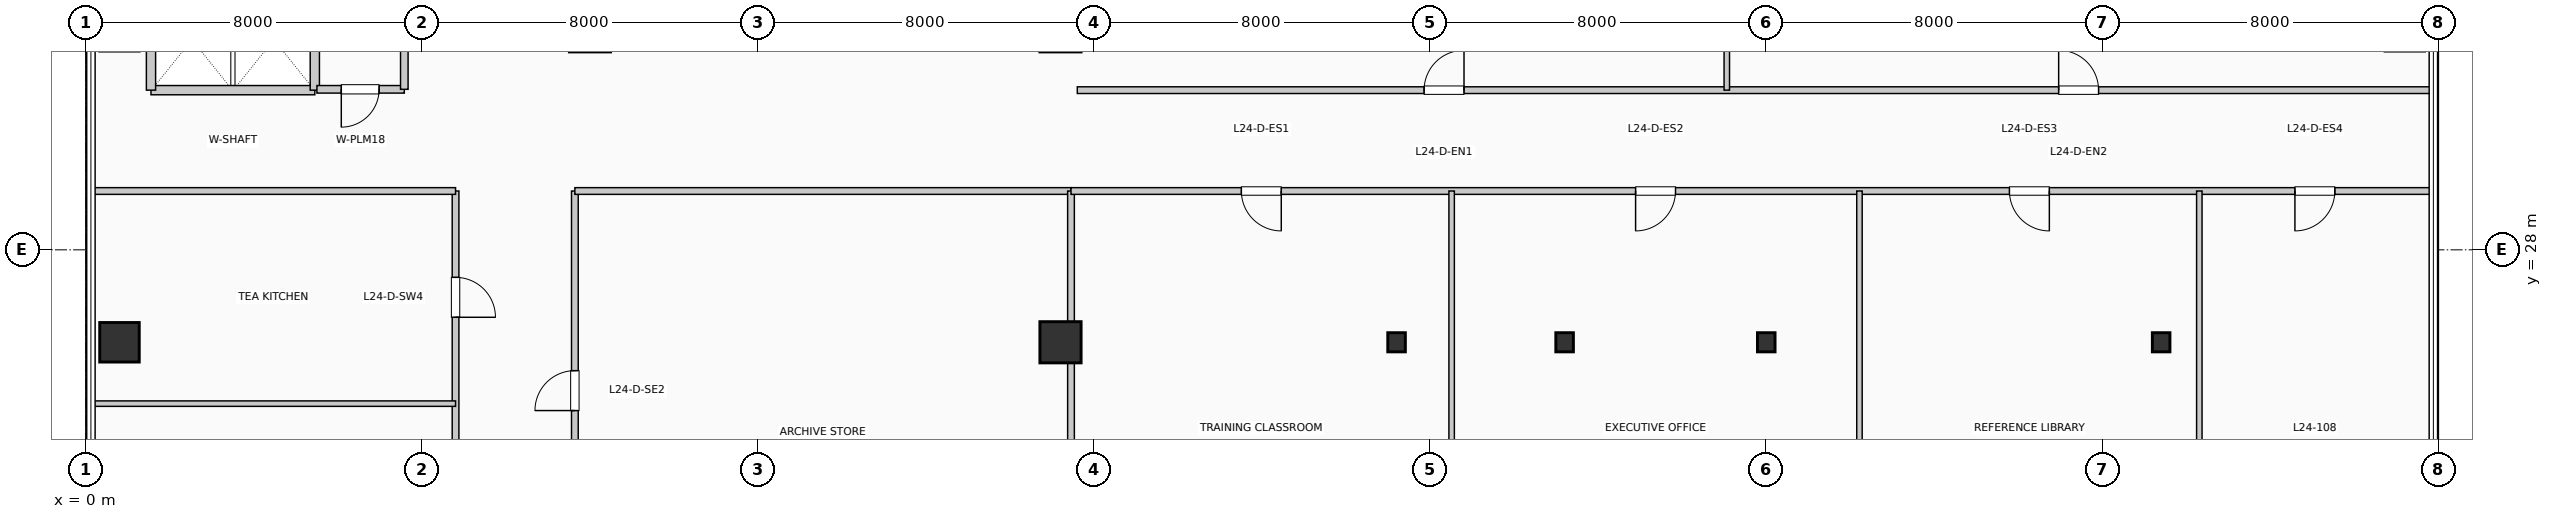
"""IFC4 building model, lengths in metres.
Left out: names, types, materials, properties, quantities, classifications, styles, units other than length and angle.
Written with IfcOpenShell. Run it as: python <this file> out.ifc"""

import sys

from ifc_helpers import new_model, si_unit, direction, frame, frame_2d, origin, origin_2d, place, context, subcontext, project, spatial, rectangle, i_section, extrude, element, fill, save


model = new_model("IFC4")
c1 = context("Model", 3, precision=1e-05, world=origin(), true_north=direction((0.0, 1.0)))
c2 = subcontext(c1, "Body", "Model", "MODEL_VIEW")
j1 = project(units=[si_unit("LENGTHUNIT", "METRE"), si_unit("PLANEANGLEUNIT", "RADIAN")], contexts=[c1])
p1 = place(None, origin())
s1 = spatial("IfcSite", under=j1, at=p1, CompositionType="ELEMENT")
p2 = place(p1, origin())
s2 = spatial("IfcBuilding", under=s1, at=p2, CompositionType="ELEMENT")
p3 = place(p2, frame((0.0, 0.0, 102.63)))
s3 = spatial("IfcBuildingStorey", under=s2, at=p3, CompositionType="ELEMENT", Elevation=102.63)
p4 = place(p3, frame((0.8, 25.8, 0.0), z_axis=(0.0, 0.0, 1.0), x_axis=(1.0, 0.0, 0.0)))
e1 = element("IfcColumn", 1, at=p4, inside=s3, PredefinedType="COLUMN", context=c2, shape_type="SweptSolid", body=[
    extrude(rectangle(XDim=0.94, YDim=0.94, at=origin_2d()), origin(), (0.0, 0.0, 1.0), 3.96),
])
p5 = place(p3, frame((23.2, 25.8, 0.0), z_axis=(0.0, 0.0, 1.0), x_axis=(1.0, 0.0, 0.0)))
e2 = element("IfcColumn", 2, at=p5, inside=s3, PredefinedType="COLUMN", context=c2, shape_type="SweptSolid", body=[
    extrude(rectangle(XDim=0.98, YDim=0.98, at=origin_2d()), origin(), (0.0, 0.0, 1.0), 3.96),
])
for number, where, z_axis, x_axis in (
    (3, (31.2, 25.8, 0.0), (0.0, 0.0, 1.0), (1.0, 0.0, 0.0)),
    (4, (35.2, 25.8, 0.0), (0.0, 0.0, 1.0), (1.0, 0.0, 0.0)),
    (5, (40.0, 25.8, 0.0), (0.0, 0.0, 1.0), (1.0, 0.0, 0.0)),
    (6, (49.4, 25.8, 0.0), (0.0, 0.0, 1.0), (1.0, 0.0, 0.0)),
):
    element("IfcColumn", number, at=place(p3, frame(where, z_axis=z_axis, x_axis=x_axis)), inside=s3, PredefinedType="COLUMN", context=c2, shape_type="SweptSolid", body=[
        extrude(i_section(OverallWidth=0.418, OverallDepth=0.455, WebThickness=0.032, FlangeThickness=0.051, at=origin_2d()), origin(), (0.0, 0.0, 1.0), 3.96),
    ])
p6 = place(p3, frame((1.55, 31.8, 0.0), z_axis=(0.0, 0.0, 1.0), x_axis=(1.0, 0.0, 0.0)))
e7 = element("IfcWall", 7, at=p6, inside=s3, PredefinedType="PARTITIONING", context=c2, shape_type="SweptSolid", body=[
    extrude(rectangle(XDim=3.9, YDim=0.22, at=frame_2d((1.95, 0.0))), origin(), (0.0, 0.0, 1.0), 3.71),
])
for number, where, z_axis, x_axis in (
    (8, (1.55, 31.8, 0.0), (0.0, 0.0, 1.0), (0.0, 1.0, 0.0)),
    (9, (5.45, 31.8, 0.0), (0.0, 0.0, 1.0), (0.0, 1.0, 0.0)),
):
    element("IfcWall", number, at=place(p3, frame(where, z_axis=z_axis, x_axis=x_axis)), inside=s3, PredefinedType="PARTITIONING", context=c2, shape_type="SweptSolid", body=[
        extrude(rectangle(XDim=2.38, YDim=0.22, at=frame_2d((1.19, 0.0))), origin(), (0.0, 0.0, 1.0), 3.71),
    ])
p7 = place(p3, frame((5.5, 31.82, 0.0), z_axis=(0.0, 0.0, 1.0), x_axis=(1.0, 0.0, 0.0)))
e10 = element("IfcWall", 10, at=p7, inside=s3, PredefinedType="PLUMBINGWALL", context=c2, shape_type="SweptSolid", body=[
    extrude(rectangle(XDim=2.08, YDim=0.18, at=frame_2d((1.04, 0.0))), origin(), (0.0, 0.0, 1.0), 3.71),
])
p8 = place(p7, frame((1.48, 0.0, 0.0), z_axis=(0.0, 0.0, 1.0), x_axis=(-1.0, 0.0, 0.0)))
e11 = element("IfcOpeningElement", 11, at=p8, cuts=e10, PredefinedType="OPENING", context=c2, shape_type="SweptSolid", body=[
    extrude(rectangle(XDim=0.9, YDim=2.1, at=frame_2d((0.45, 1.05))), frame((0.0, 0.1, 0.0), z_axis=(0.0, -1.0, 0.0), x_axis=(1.0, 0.0, 0.0)), (0.0, 0.0, 1.0), 0.2),
])
p9 = place(p3, frame((7.58, 31.82, 0.0), z_axis=(0.0, 0.0, 1.0), x_axis=(0.0, 1.0, 0.0)))
e12 = element("IfcWall", 12, at=p9, inside=s3, PredefinedType="PLUMBINGWALL", context=c2, shape_type="SweptSolid", body=[
    extrude(rectangle(XDim=2.36, YDim=0.18, at=frame_2d((1.18, 0.0))), origin(), (0.0, 0.0, 1.0), 3.71),
])
p10 = place(p3, frame((8.8, 6.4, 0.0), z_axis=(0.0, 0.0, 1.0), x_axis=(0.0, 1.0, 0.0)))
e13 = element("IfcWall", 13, at=p10, inside=s3, PredefinedType="PARTITIONING", context=c2, shape_type="SweptSolid", body=[
    extrude(rectangle(XDim=23.0, YDim=0.16, at=frame_2d((11.5, 0.0))), origin(), (0.0, 0.0, 1.0), 3.71),
])
p11 = place(p10, frame((3.235, 0.0, 0.0), z_axis=(0.0, 0.0, 1.0), x_axis=(-1.0, 0.0, 0.0)))
e14 = element("IfcOpeningElement", 14, at=p11, cuts=e13, PredefinedType="OPENING", context=c2, shape_type="SweptSolid", body=[
    extrude(rectangle(XDim=0.95, YDim=2.15, at=frame_2d((0.475, 1.075))), frame((0.0, 0.09, 0.0), z_axis=(0.0, -1.0, 0.0), x_axis=(1.0, 0.0, 0.0)), (0.0, 0.0, 1.0), 0.18),
])
p12 = place(p10, frame((9.215, 0.0, 0.0), z_axis=(0.0, 0.0, 1.0), x_axis=(-1.0, 0.0, 0.0)))
e15 = element("IfcOpeningElement", 15, at=p12, cuts=e13, PredefinedType="OPENING", context=c2, shape_type="SweptSolid", body=[
    extrude(rectangle(XDim=0.95, YDim=2.15, at=frame_2d((0.475, 1.075))), frame((0.0, 0.09, 0.0), z_axis=(0.0, -1.0, 0.0), x_axis=(1.0, 0.0, 0.0)), (0.0, 0.0, 1.0), 0.18),
])
p13 = place(p10, frame((15.425, 0.0, 0.0), z_axis=(0.0, 0.0, 1.0), x_axis=(-1.0, 0.0, 0.0)))
e16 = element("IfcOpeningElement", 16, at=p13, cuts=e13, PredefinedType="OPENING", context=c2, shape_type="SweptSolid", body=[
    extrude(rectangle(XDim=0.95, YDim=2.15, at=frame_2d((0.475, 1.075))), frame((0.0, 0.09, 0.0), z_axis=(0.0, -1.0, 0.0), x_axis=(1.0, 0.0, 0.0)), (0.0, 0.0, 1.0), 0.18),
])
p14 = place(p10, frame((20.945, 0.0, 0.0), z_axis=(0.0, 0.0, 1.0), x_axis=(-1.0, 0.0, 0.0)))
e17 = element("IfcOpeningElement", 17, at=p14, cuts=e13, PredefinedType="OPENING", context=c2, shape_type="SweptSolid", body=[
    extrude(rectangle(XDim=0.95, YDim=2.15, at=frame_2d((0.475, 1.075))), frame((0.0, 0.09, 0.0), z_axis=(0.0, -1.0, 0.0), x_axis=(1.0, 0.0, 0.0)), (0.0, 0.0, 1.0), 0.18),
])
p15 = place(p3, frame((11.64, 6.4, 0.0), z_axis=(0.0, 0.0, 1.0), x_axis=(0.0, 1.0, 0.0)))
e18 = element("IfcWall", 18, at=p15, inside=s3, PredefinedType="PARTITIONING", context=c2, shape_type="SweptSolid", body=[
    extrude(rectangle(XDim=23.0, YDim=0.16, at=frame_2d((11.5, 0.0))), origin(), (0.0, 0.0, 1.0), 2.995),
])
p16 = place(p15, frame((4.275, 0.0, 0.0)))
e19 = element("IfcOpeningElement", 19, at=p16, cuts=e18, PredefinedType="OPENING", context=c2, shape_type="SweptSolid", body=[
    extrude(rectangle(XDim=0.95, YDim=2.15, at=frame_2d((0.475, 1.075))), frame((0.0, 0.09, 0.0), z_axis=(0.0, -1.0, 0.0), x_axis=(1.0, 0.0, 0.0)), (0.0, 0.0, 1.0), 0.18),
])
p17 = place(p15, frame((17.775, 0.0, 0.0)))
e20 = element("IfcOpeningElement", 20, at=p17, cuts=e18, PredefinedType="OPENING", context=c2, shape_type="SweptSolid", body=[
    extrude(rectangle(XDim=0.95, YDim=2.15, at=frame_2d((0.475, 1.075))), frame((0.0, 0.09, 0.0), z_axis=(0.0, -1.0, 0.0), x_axis=(1.0, 0.0, 0.0)), (0.0, 0.0, 1.0), 0.18),
])
p18 = place(p3, frame((0.19, 29.4, 0.0), z_axis=(0.0, 0.0, 1.0), x_axis=(1.0, 0.0, 0.0)))
e21 = element("IfcWall", 21, at=p18, inside=s3, PredefinedType="PARTITIONING", context=c2, shape_type="SweptSolid", body=[
    extrude(rectangle(XDim=8.61, YDim=0.16, at=frame_2d((4.305, 0.0))), origin(), (0.0, 0.0, 1.0), 3.365),
])
p19 = place(p3, frame((11.64, 29.4, 0.0), z_axis=(0.0, 0.0, 1.0), x_axis=(1.0, 0.0, 0.0)))
e22 = element("IfcWall", 22, at=p19, inside=s3, PredefinedType="PARTITIONING", context=c2, shape_type="SweptSolid", body=[
    extrude(rectangle(XDim=11.81, YDim=0.16, at=frame_2d((5.905, 0.0))), origin(), (0.0, 0.0, 1.0), 3.71),
])
p20 = place(p3, frame((23.45, 1.04, 0.0), z_axis=(0.0, 0.0, 1.0), x_axis=(0.0, 1.0, 0.0)))
e23 = element("IfcWall", 23, at=p20, inside=s3, PredefinedType="PARTITIONING", context=c2, shape_type="SweptSolid", body=[
    extrude(rectangle(XDim=28.36, YDim=0.16, at=frame_2d((14.18, 0.0))), origin(), (0.0, 0.0, 1.0), 2.995),
])
p21 = place(p3, frame((0.19, 24.34, 0.0), z_axis=(0.0, 0.0, 1.0), x_axis=(1.0, 0.0, 0.0)))
e24 = element("IfcWall", 24, at=p21, inside=s3, PredefinedType="PARTITIONING", context=c2, shape_type="SweptSolid", body=[
    extrude(rectangle(XDim=8.61, YDim=0.13, at=frame_2d((4.305, 0.0))), origin(), (0.0, 0.0, 1.0), 3.71),
])
p22 = place(p3, frame((23.45, 29.4, 0.0), z_axis=(0.0, 0.0, 1.0), x_axis=(1.0, 0.0, 0.0)))
e25 = element("IfcWall", 25, at=p22, inside=s3, PredefinedType="PARTITIONING", context=c2, shape_type="SweptSolid", body=[
    extrude(rectangle(XDim=32.36, YDim=0.16, at=frame_2d((16.18, 0.0))), origin(), (0.0, 0.0, 1.0), 3.365),
])
p23 = place(p22, frame((5.005, 0.0, 0.0), z_axis=(0.0, 0.0, 1.0), x_axis=(-1.0, 0.0, 0.0)))
e26 = element("IfcOpeningElement", 26, at=p23, cuts=e25, PredefinedType="OPENING", context=c2, shape_type="SweptSolid", body=[
    extrude(rectangle(XDim=0.95, YDim=2.15, at=frame_2d((0.475, 1.075))), frame((0.0, 0.09, 0.0), z_axis=(0.0, -1.0, 0.0), x_axis=(1.0, 0.0, 0.0)), (0.0, 0.0, 1.0), 0.18),
])
p24 = place(p22, frame((14.39, 0.0, 0.0), z_axis=(0.0, 0.0, 1.0), x_axis=(-1.0, 0.0, 0.0)))
e27 = element("IfcOpeningElement", 27, at=p24, cuts=e25, PredefinedType="OPENING", context=c2, shape_type="SweptSolid", body=[
    extrude(rectangle(XDim=0.95, YDim=2.15, at=frame_2d((0.475, 1.075))), frame((0.0, 0.09, 0.0), z_axis=(0.0, -1.0, 0.0), x_axis=(1.0, 0.0, 0.0)), (0.0, 0.0, 1.0), 0.18),
])
p25 = place(p22, frame((23.289, 0.0, 0.0), z_axis=(0.0, 0.0, 1.0), x_axis=(-1.0, 0.0, 0.0)))
e28 = element("IfcOpeningElement", 28, at=p25, cuts=e25, PredefinedType="OPENING", context=c2, shape_type="SweptSolid", body=[
    extrude(rectangle(XDim=0.95, YDim=2.15, at=frame_2d((0.475, 1.075))), frame((0.0, 0.09, 0.0), z_axis=(0.0, -1.0, 0.0), x_axis=(1.0, 0.0, 0.0)), (0.0, 0.0, 1.0), 0.18),
])
p26 = place(p22, frame((30.084, 0.0, 0.0), z_axis=(0.0, 0.0, 1.0), x_axis=(-1.0, 0.0, 0.0)))
e29 = element("IfcOpeningElement", 29, at=p26, cuts=e25, PredefinedType="OPENING", context=c2, shape_type="SweptSolid", body=[
    extrude(rectangle(XDim=0.95, YDim=2.15, at=frame_2d((0.475, 1.075))), frame((0.0, 0.09, 0.0), z_axis=(0.0, -1.0, 0.0), x_axis=(1.0, 0.0, 0.0)), (0.0, 0.0, 1.0), 0.18),
])
p27 = place(p3, frame((23.6, 31.8, 0.0), z_axis=(0.0, 0.0, 1.0), x_axis=(1.0, 0.0, 0.0)))
e30 = element("IfcWall", 30, at=p27, inside=s3, PredefinedType="PARTITIONING", context=c2, shape_type="SweptSolid", body=[
    extrude(rectangle(XDim=32.21, YDim=0.16, at=frame_2d((16.105, 0.0))), origin(), (0.0, 0.0, 1.0), 3.71),
])
p28 = place(p27, frame((8.255, 0.0, 0.0)))
e31 = element("IfcOpeningElement", 31, at=p28, cuts=e30, PredefinedType="OPENING", context=c2, shape_type="SweptSolid", body=[
    extrude(rectangle(XDim=0.95, YDim=2.15, at=frame_2d((0.475, 1.075))), frame((0.0, 0.09, 0.0), z_axis=(0.0, -1.0, 0.0), x_axis=(1.0, 0.0, 0.0)), (0.0, 0.0, 1.0), 0.18),
])
p29 = place(p27, frame((23.36, 0.0, 0.0)))
e32 = element("IfcOpeningElement", 32, at=p29, cuts=e30, PredefinedType="OPENING", context=c2, shape_type="SweptSolid", body=[
    extrude(rectangle(XDim=0.95, YDim=2.15, at=frame_2d((0.475, 1.075))), frame((0.0, 0.09, 0.0), z_axis=(0.0, -1.0, 0.0), x_axis=(1.0, 0.0, 0.0)), (0.0, 0.0, 1.0), 0.18),
])
for number, where, z_axis, x_axis in (
    (33, (32.511, 18.19, 0.0), (0.0, 0.0, 1.0), (0.0, 1.0, 0.0)),
    (34, (42.219, 18.19, 0.0), (0.0, 0.0, 1.0), (0.0, 1.0, 0.0)),
    (35, (50.309, 18.19, 0.0), (0.0, 0.0, 1.0), (0.0, 1.0, 0.0)),
):
    element("IfcWall", number, at=place(p3, frame(where, z_axis=z_axis, x_axis=x_axis)), inside=s3, PredefinedType="PARTITIONING", context=c2, shape_type="SweptSolid", body=[
        extrude(rectangle(XDim=11.21, YDim=0.13, at=frame_2d((5.605, 0.0))), origin(), (0.0, 0.0, 1.0), 3.71),
    ])
p30 = place(p3, frame((39.061, 31.8, 0.0), z_axis=(0.0, 0.0, 1.0), x_axis=(0.0, 1.0, 0.0)))
e36 = element("IfcWall", 36, at=p30, inside=s3, PredefinedType="PARTITIONING", context=c2, shape_type="SweptSolid", body=[
    extrude(rectangle(XDim=14.01, YDim=0.13, at=frame_2d((7.005, 0.0))), origin(), (0.0, 0.0, 1.0), 3.71),
])
p31 = place(p8, origin())
e37 = element("IfcDoor", 37, at=p31, inside=s3, OperationType="SINGLE_SWING_LEFT", PredefinedType="DOOR", context=c2, shape_type="SweptSolid", body=[
    extrude(rectangle(XDim=0.9, YDim=2.1, at=frame_2d((0.45, 1.05))), frame((0.0, 0.025, 0.0), z_axis=(0.0, -1.0, 0.0), x_axis=(1.0, 0.0, 0.0)), (0.0, 0.0, 1.0), 0.05),
])
fill(e11, e37)
p32 = place(p14, origin())
e38 = element("IfcDoor", 38, at=p32, inside=s3, OperationType="SINGLE_SWING_LEFT", PredefinedType="DOOR", context=c2, shape_type="SweptSolid", body=[
    extrude(rectangle(XDim=0.95, YDim=2.15, at=frame_2d((0.475, 1.075))), frame((0.0, 0.025, 0.0), z_axis=(0.0, -1.0, 0.0), x_axis=(1.0, 0.0, 0.0)), (0.0, 0.0, 1.0), 0.05),
])
fill(e17, e38)
p33 = place(p17, origin())
e39 = element("IfcDoor", 39, at=p33, inside=s3, OperationType="SINGLE_SWING_LEFT", PredefinedType="DOOR", context=c2, shape_type="SweptSolid", body=[
    extrude(rectangle(XDim=0.95, YDim=2.15, at=frame_2d((0.475, 1.075))), frame((0.0, 0.025, 0.0), z_axis=(0.0, -1.0, 0.0), x_axis=(1.0, 0.0, 0.0)), (0.0, 0.0, 1.0), 0.05),
])
fill(e20, e39)
p34 = place(p23, origin())
e40 = element("IfcDoor", 40, at=p34, inside=s3, OperationType="SINGLE_SWING_RIGHT", PredefinedType="DOOR", context=c2, shape_type="SweptSolid", body=[
    extrude(rectangle(XDim=0.95, YDim=2.15, at=frame_2d((0.475, 1.075))), frame((0.0, 0.025, 0.0), z_axis=(0.0, -1.0, 0.0), x_axis=(1.0, 0.0, 0.0)), (0.0, 0.0, 1.0), 0.05),
])
fill(e26, e40)
p35 = place(p24, origin())
e41 = element("IfcDoor", 41, at=p35, inside=s3, OperationType="SINGLE_SWING_LEFT", PredefinedType="DOOR", context=c2, shape_type="SweptSolid", body=[
    extrude(rectangle(XDim=0.95, YDim=2.15, at=frame_2d((0.475, 1.075))), frame((0.0, 0.025, 0.0), z_axis=(0.0, -1.0, 0.0), x_axis=(1.0, 0.0, 0.0)), (0.0, 0.0, 1.0), 0.05),
])
fill(e27, e41)
p36 = place(p25, origin())
e42 = element("IfcDoor", 42, at=p36, inside=s3, OperationType="SINGLE_SWING_RIGHT", PredefinedType="DOOR", context=c2, shape_type="SweptSolid", body=[
    extrude(rectangle(XDim=0.95, YDim=2.15, at=frame_2d((0.475, 1.075))), frame((0.0, 0.025, 0.0), z_axis=(0.0, -1.0, 0.0), x_axis=(1.0, 0.0, 0.0)), (0.0, 0.0, 1.0), 0.05),
])
fill(e28, e42)
p37 = place(p26, origin())
e43 = element("IfcDoor", 43, at=p37, inside=s3, OperationType="SINGLE_SWING_LEFT", PredefinedType="DOOR", context=c2, shape_type="SweptSolid", body=[
    extrude(rectangle(XDim=0.95, YDim=2.15, at=frame_2d((0.475, 1.075))), frame((0.0, 0.025, 0.0), z_axis=(0.0, -1.0, 0.0), x_axis=(1.0, 0.0, 0.0)), (0.0, 0.0, 1.0), 0.05),
])
fill(e29, e43)
p38 = place(p28, origin())
e44 = element("IfcDoor", 44, at=p38, inside=s3, OperationType="SINGLE_SWING_RIGHT", PredefinedType="DOOR", context=c2, shape_type="SweptSolid", body=[
    extrude(rectangle(XDim=0.95, YDim=2.15, at=frame_2d((0.475, 1.075))), frame((0.0, 0.025, 0.0), z_axis=(0.0, -1.0, 0.0), x_axis=(1.0, 0.0, 0.0)), (0.0, 0.0, 1.0), 0.05),
])
fill(e31, e44)
p39 = place(p29, origin())
e45 = element("IfcDoor", 45, at=p39, inside=s3, OperationType="SINGLE_SWING_LEFT", PredefinedType="DOOR", context=c2, shape_type="SweptSolid", body=[
    extrude(rectangle(XDim=0.95, YDim=2.15, at=frame_2d((0.475, 1.075))), frame((0.0, 0.025, 0.0), z_axis=(0.0, -1.0, 0.0), x_axis=(1.0, 0.0, 0.0)), (0.0, 0.0, 1.0), 0.05),
])
fill(e32, e45)
save(model, sys.argv[1])
